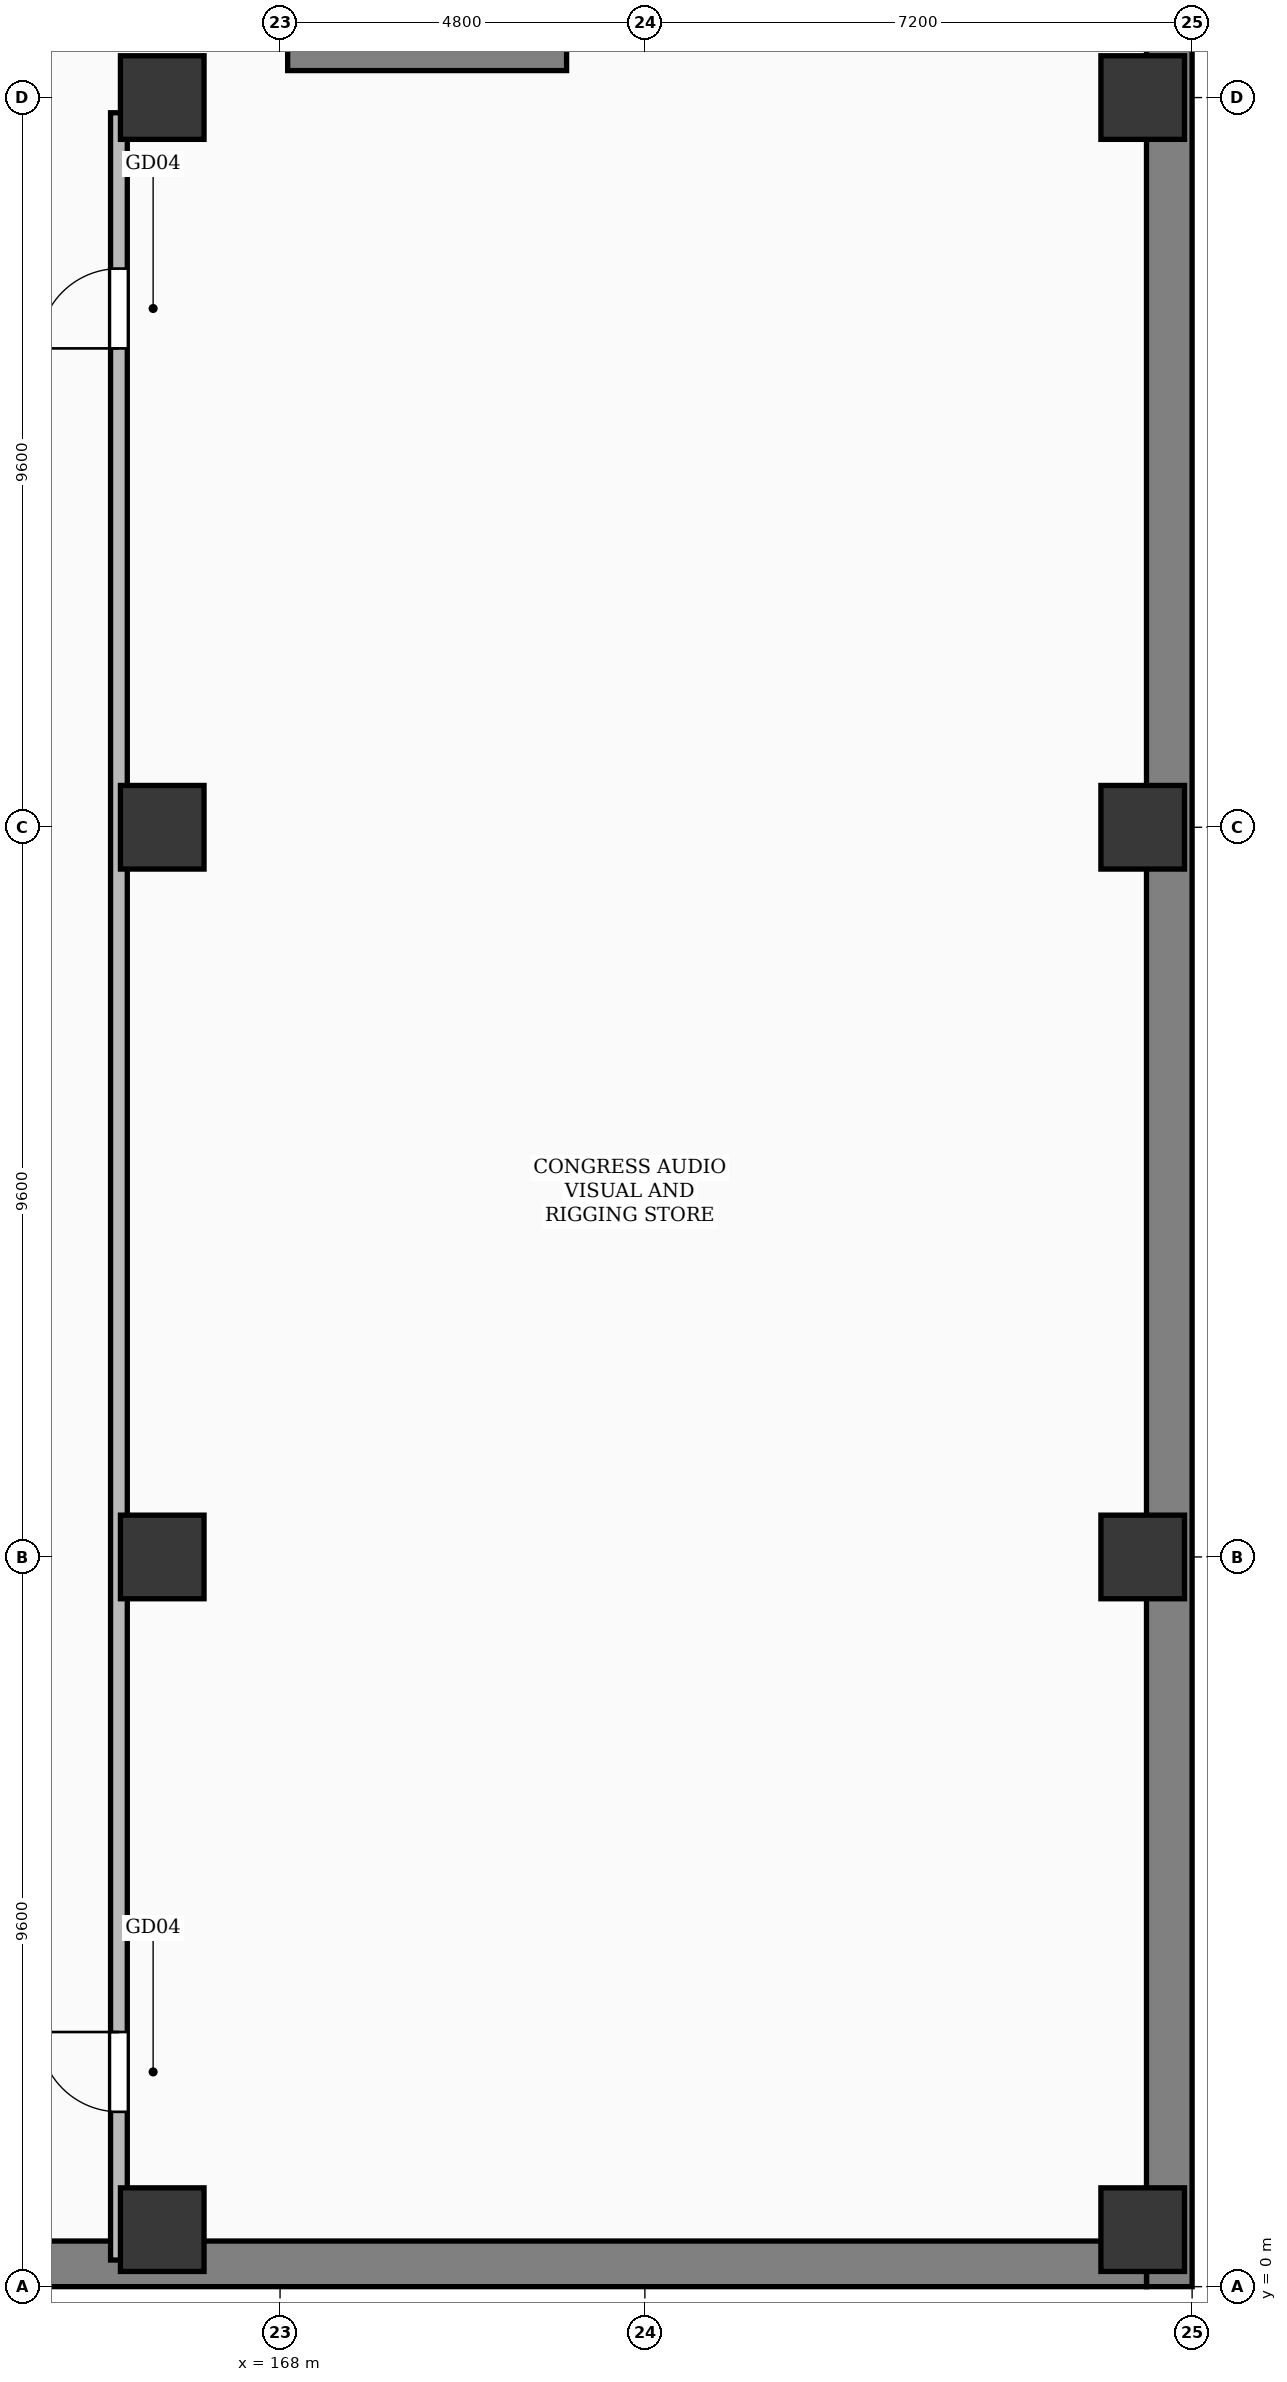
"""IFC4 building model, lengths in metres.
Left out: names, types, materials, properties, quantities, classifications, styles, units other than length and angle.
Written with IfcOpenShell. Run it as: python <this file> out.ifc"""

import sys

from ifc_helpers import new_model, si_unit, direction, frame, frame_2d, origin, origin_2d, place, context, subcontext, project, spatial, rectangle, extrude, element, fill, save


model = new_model("IFC4")
c1 = context("Model", 3, precision=1e-05, world=origin(), true_north=direction((0.0, 1.0)))
c2 = subcontext(c1, "Body", "Model", "MODEL_VIEW")
j1 = project(units=[si_unit("LENGTHUNIT", "METRE"), si_unit("PLANEANGLEUNIT", "RADIAN")], contexts=[c1])
p1 = place(None, origin())
s1 = spatial("IfcSite", under=j1, at=p1, CompositionType="ELEMENT")
p2 = place(p1, origin())
s2 = spatial("IfcBuilding", under=s1, at=p2, CompositionType="ELEMENT")
p3 = place(p2, frame((0.0, 0.0, -4.2)))
s3 = spatial("IfcBuildingStorey", under=s2, at=p3, CompositionType="ELEMENT", Elevation=-4.2)
for number, where, z_axis, x_axis in (
    (1, (166.45, 0.75, 0.0), (0.0, 0.0, 1.0), (1.0, 0.0, 0.0)),
    (2, (166.45, 9.6, 0.0), (0.0, 0.0, 1.0), (1.0, 0.0, 0.0)),
    (3, (166.45, 19.2, 0.0), (0.0, 0.0, 1.0), (1.0, 0.0, 0.0)),
    (4, (166.45, 28.8, 0.0), (0.0, 0.0, 1.0), (1.0, 0.0, 0.0)),
    (5, (179.35, 0.75, 0.0), (0.0, 0.0, 1.0), (1.0, 0.0, 0.0)),
    (6, (179.35, 9.6, 0.0), (0.0, 0.0, 1.0), (1.0, 0.0, 0.0)),
    (7, (179.35, 19.2, 0.0), (0.0, 0.0, 1.0), (1.0, 0.0, 0.0)),
    (8, (179.35, 28.8, 0.0), (0.0, 0.0, 1.0), (1.0, 0.0, 0.0)),
):
    element("IfcColumn", number, at=place(p3, frame(where, z_axis=z_axis, x_axis=x_axis)), inside=s3, PredefinedType="COLUMN", context=c2, shape_type="SweptSolid", body=[
        extrude(rectangle(XDim=1.1, YDim=1.1, at=origin_2d()), origin(), (0.0, 0.0, 1.0), 4.2),
    ])
p4 = place(p3, frame((179.7, 126.0, 0.0), z_axis=(0.0, 0.0, 1.0), x_axis=(0.0, -1.0, 0.0)))
e9 = element("IfcWall", 9, at=p4, inside=s3, PredefinedType="USERDEFINED", context=c2, shape_type="SweptSolid", body=[
    extrude(rectangle(XDim=126.0, YDim=0.6, at=frame_2d((63.0, 0.0))), origin(), (0.0, 0.0, 1.0), 3.78),
])
p5 = place(p3, frame((179.4, 0.3, 0.0), z_axis=(0.0, 0.0, 1.0), x_axis=(-1.0, 0.0, 0.0)))
e10 = element("IfcWall", 10, at=p5, inside=s3, PredefinedType="USERDEFINED", context=c2, shape_type="SweptSolid", body=[
    extrude(rectangle(XDim=121.2, YDim=0.6, at=frame_2d((60.6, 0.0))), origin(), (0.0, 0.0, 1.0), 3.78),
])
p6 = place(p3, frame((168.1, 29.38, 0.0), z_axis=(0.0, 0.0, 1.0), x_axis=(1.0, 0.0, 0.0)))
e11 = element("IfcWall", 11, at=p6, inside=s3, PredefinedType="SHEAR", context=c2, shape_type="SweptSolid", body=[
    extrude(rectangle(XDim=3.67, YDim=0.45, at=frame_2d((1.835, 0.0))), origin(), (0.0, 0.0, 1.0), 3.78),
])
p7 = place(p3, frame((165.88, 0.35, 0.0), z_axis=(0.0, 0.0, 1.0), x_axis=(0.0, 1.0, 0.0)))
e12 = element("IfcWall", 12, at=p7, inside=s3, PredefinedType="PARTITIONING", context=c2, shape_type="SweptSolid", body=[
    extrude(rectangle(XDim=28.25, YDim=0.22, at=frame_2d((14.125, 0.0))), origin(), (0.0, 0.0, 1.0), 2.932),
])
p8 = place(p7, frame((1.95, 0.0, 0.0)))
e13 = element("IfcOpeningElement", 13, at=p8, cuts=e12, PredefinedType="OPENING", context=c2, shape_type="SweptSolid", body=[
    extrude(rectangle(XDim=1.05, YDim=2.22, at=frame_2d((0.525, 1.11))), frame((0.0, 0.122, 0.0), z_axis=(0.0, -1.0, 0.0), x_axis=(1.0, 0.0, 0.0)), (0.0, 0.0, 1.0), 0.244),
])
p9 = place(p7, frame((25.15, 0.0, 0.0)))
e14 = element("IfcOpeningElement", 14, at=p9, cuts=e12, PredefinedType="OPENING", context=c2, shape_type="SweptSolid", body=[
    extrude(rectangle(XDim=1.05, YDim=2.22, at=frame_2d((0.525, 1.11))), frame((0.0, 0.122, 0.0), z_axis=(0.0, -1.0, 0.0), x_axis=(1.0, 0.0, 0.0)), (0.0, 0.0, 1.0), 0.244),
])
p10 = place(p8, origin())
e15 = element("IfcDoor", 15, at=p10, inside=s3, OperationType="SINGLE_SWING_RIGHT", PredefinedType="DOOR", context=c2, shape_type="SweptSolid", body=[
    extrude(rectangle(XDim=1.05, YDim=2.22, at=frame_2d((0.525, 1.11))), frame((0.0, 0.025, 0.0), z_axis=(0.0, -1.0, 0.0), x_axis=(1.0, 0.0, 0.0)), (0.0, 0.0, 1.0), 0.05),
])
fill(e13, e15)
p11 = place(p9, origin())
e16 = element("IfcDoor", 16, at=p11, inside=s3, OperationType="SINGLE_SWING_LEFT", PredefinedType="DOOR", context=c2, shape_type="SweptSolid", body=[
    extrude(rectangle(XDim=1.05, YDim=2.22, at=frame_2d((0.525, 1.11))), frame((0.0, 0.025, 0.0), z_axis=(0.0, -1.0, 0.0), x_axis=(1.0, 0.0, 0.0)), (0.0, 0.0, 1.0), 0.05),
])
fill(e14, e16)
save(model, sys.argv[1])
